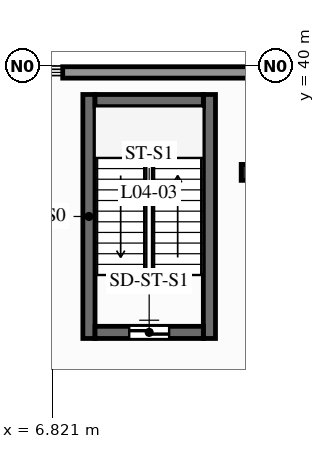
"""IFC4 building model, lengths in metres.
Left out: names, types, materials, properties, quantities, classifications, styles, units other than length and angle.
Written with IfcOpenShell. Run it as: python <this file> out.ifc"""

import sys

from ifc_helpers import new_model, si_unit, direction, frame, frame_2d, origin, origin_2d, place, context, subcontext, project, spatial, rectangle, i_section, extrude, element, fill, save


model = new_model("IFC4")
c1 = context("Model", 3, precision=1e-05, world=origin(), true_north=direction((0.0, 1.0)))
c2 = subcontext(c1, "Body", "Model", "MODEL_VIEW")
j1 = project(units=[si_unit("LENGTHUNIT", "METRE"), si_unit("PLANEANGLEUNIT", "RADIAN")], contexts=[c1])
p1 = place(None, origin())
s1 = spatial("IfcSite", under=j1, at=p1, CompositionType="ELEMENT")
p2 = place(p1, origin())
s2 = spatial("IfcBuilding", under=s1, at=p2, CompositionType="ELEMENT")
p3 = place(p2, frame((0.0, 0.0, 18.0)))
s3 = spatial("IfcBuildingStorey", under=s2, at=p3, CompositionType="ELEMENT", Elevation=18.0)
p4 = place(p3, frame((12.0, 37.2, 0.0), z_axis=(0.0, 0.0, 1.0), x_axis=(1.0, 0.0, 0.0)))
e1 = element("IfcColumn", 1, at=p4, inside=s3, PredefinedType="COLUMN", context=c2, shape_type="SweptSolid", body=[
    extrude(i_section(OverallWidth=0.407, OverallDepth=0.419, WebThickness=0.031, FlangeThickness=0.049, FilletRadius=0.015, at=origin_2d()), origin(), (0.0, 0.0, 1.0), 4.5),
])
p5 = place(p3, frame((7.1, 39.83, 0.0), z_axis=(0.0, 0.0, 1.0), x_axis=(1.0, 0.0, 0.0)))
e2 = element("IfcWall", 2, at=p5, inside=s3, PredefinedType="STANDARD", context=c2, shape_type="SweptSolid", body=[
    extrude(rectangle(XDim=11.55, YDim=0.3, at=frame_2d((5.775, 0.0))), origin(), (0.0, 0.0, 1.0), 4.22),
])
for number, where, z_axis, x_axis in (
    (3, (7.79, 32.83, 0.0), (0.0, 0.0, 1.0), (0.0, 1.0, 0.0)),
    (4, (10.96, 32.83, 0.0), (0.0, 0.0, 1.0), (0.0, 1.0, 0.0)),
):
    element("IfcWall", number, at=place(p3, frame(where, z_axis=z_axis, x_axis=x_axis)), inside=s3, PredefinedType="SHEAR", context=c2, shape_type="SweptSolid", body=[
        extrude(rectangle(XDim=6.42, YDim=0.32, at=frame_2d((3.21, 0.0))), origin(), (0.0, 0.0, 1.0), 4.22),
    ])
p6 = place(p3, frame((7.95, 32.99, 0.0), z_axis=(0.0, 0.0, 1.0), x_axis=(1.0, 0.0, 0.0)))
e5 = element("IfcWall", 5, at=p6, inside=s3, PredefinedType="SHEAR", context=c2, shape_type="SweptSolid", body=[
    extrude(rectangle(XDim=2.85, YDim=0.32, at=frame_2d((1.425, 0.0))), origin(), (0.0, 0.0, 1.0), 4.22),
])
p7 = place(p6, frame((0.9, 0.0, 0.0)))
e6 = element("IfcOpeningElement", 6, at=p7, cuts=e5, PredefinedType="OPENING", context=c2, shape_type="SweptSolid", body=[
    extrude(rectangle(XDim=1.05, YDim=2.06, at=frame_2d((0.525, 1.03))), frame((0.0, 0.17, 0.0), z_axis=(0.0, -1.0, 0.0), x_axis=(1.0, 0.0, 0.0)), (0.0, 0.0, 1.0), 0.34),
])
p8 = place(p3, frame((10.8, 39.09, 0.0), z_axis=(0.0, 0.0, 1.0), x_axis=(-1.0, 0.0, 0.0)))
e7 = element("IfcWall", 7, at=p8, inside=s3, PredefinedType="SHEAR", context=c2, shape_type="SweptSolid", body=[
    extrude(rectangle(XDim=2.85, YDim=0.32, at=frame_2d((1.425, 0.0))), origin(), (0.0, 0.0, 1.0), 4.22),
])
p9 = place(p7, origin())
e8 = element("IfcDoor", 8, at=p9, inside=s3, OperationType="SINGLE_SWING_LEFT", PredefinedType="DOOR", context=c2, shape_type="SweptSolid", body=[
    extrude(rectangle(XDim=1.05, YDim=2.06, at=frame_2d((0.525, 1.03))), frame((0.0, 0.025, 0.0), z_axis=(0.0, -1.0, 0.0), x_axis=(1.0, 0.0, 0.0)), (0.0, 0.0, 1.0), 0.05),
])
fill(e6, e8)
save(model, sys.argv[1])
